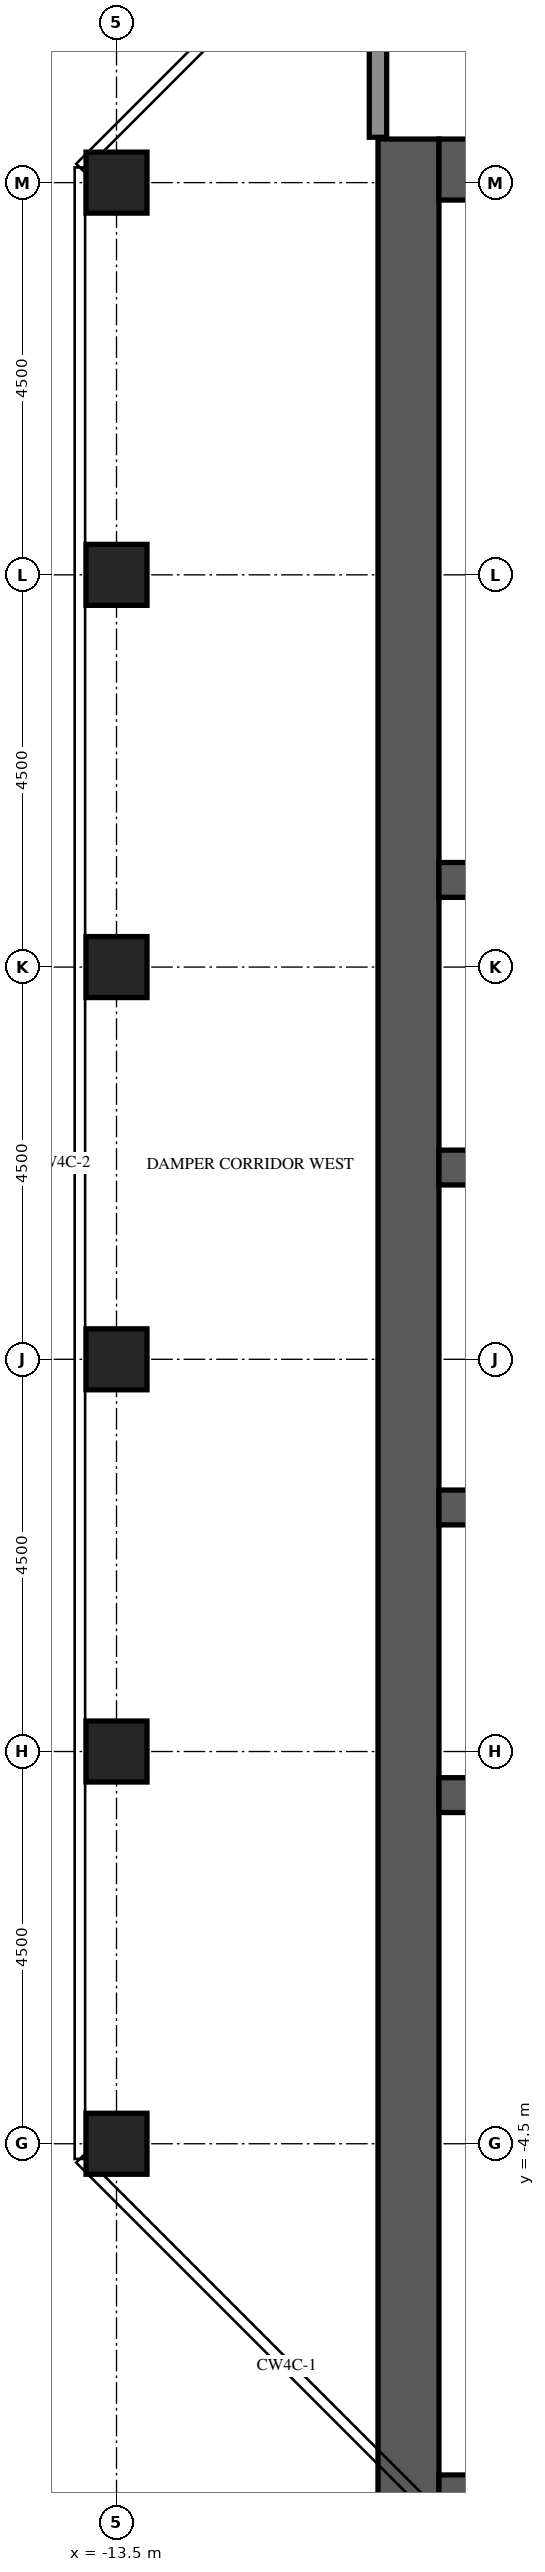
"""IFC4 building model, lengths in metres.
Left out: names, types, materials, properties, quantities, classifications, styles, units other than length and angle.
Written with IfcOpenShell. Run it as: python <this file> out.ifc"""

import sys

from ifc_helpers import new_model, si_unit, direction, frame, frame_2d, origin, origin_2d, place, context, subcontext, project, spatial, rectangle, extrude, element, fill, save


model = new_model("IFC4")
c1 = context("Model", 3, precision=1e-05, world=origin(), true_north=direction((0.0, 1.0)))
c2 = subcontext(c1, "Body", "Model", "MODEL_VIEW")
j1 = project(units=[si_unit("LENGTHUNIT", "METRE"), si_unit("PLANEANGLEUNIT", "RADIAN")], contexts=[c1])
p1 = place(None, origin())
s1 = spatial("IfcSite", under=j1, at=p1, CompositionType="ELEMENT")
p2 = place(p1, origin())
s2 = spatial("IfcBuilding", under=s1, at=p2, CompositionType="ELEMENT")
p3 = place(p2, frame((0.0, 0.0, 311.8)))
s3 = spatial("IfcBuildingStorey", under=s2, at=p3, CompositionType="ELEMENT", Elevation=311.8)
for number, where, z_axis, x_axis in (
    (1, (-13.5, -4.5, -0.6), (0.0, 0.0, 1.0), (1.0, 0.0, 0.0)),
    (2, (-13.5, 0.0, -0.6), (0.0, 0.0, 1.0), (1.0, 0.0, 0.0)),
    (3, (-13.5, 4.5, -0.6), (0.0, 0.0, 1.0), (1.0, 0.0, 0.0)),
    (4, (-13.5, 9.0, -0.6), (0.0, 0.0, 1.0), (1.0, 0.0, 0.0)),
    (5, (-13.5, 13.5, -0.6), (0.0, 0.0, 1.0), (1.0, 0.0, 0.0)),
    (6, (-13.5, 18.0, -0.6), (0.0, 0.0, 1.0), (1.0, 0.0, 0.0)),
):
    element("IfcColumn", number, at=place(p3, frame(where, z_axis=z_axis, x_axis=x_axis)), inside=s3, PredefinedType="COLUMN", context=c2, shape_type="SweptSolid", body=[
        extrude(rectangle(XDim=0.7, YDim=0.7, at=origin_2d()), origin(), (0.0, 0.0, 1.0), 5.4),
    ])
p4 = place(p3, frame((-10.15, -9.0, 0.0), z_axis=(0.0, 0.0, 1.0), x_axis=(0.0, 1.0, 0.0)))
e7 = element("IfcWall", 7, at=p4, inside=s3, PredefinedType="SHEAR", context=c2, shape_type="SweptSolid", body=[
    extrude(rectangle(XDim=27.5, YDim=0.7, at=frame_2d((13.75, 0.0))), origin(), (0.0, 0.0, 1.0), 4.8),
])
p5 = place(p4, frame((12.55, 0.0, 0.0)))
e8 = element("IfcOpeningElement", 8, at=p5, cuts=e7, PredefinedType="OPENING", context=c2, shape_type="SweptSolid", body=[
    extrude(rectangle(XDim=2.4, YDim=2.4, at=frame_2d((1.2, 1.2))), frame((0.0, 0.36, 0.0), z_axis=(0.0, -1.0, 0.0), x_axis=(1.0, 0.0, 0.0)), (0.0, 0.0, 1.0), 0.72),
])
p6 = place(p4, frame((6.825, 0.0, 0.0)))
e9 = element("IfcOpeningElement", 9, at=p6, cuts=e7, PredefinedType="OPENING", context=c2, shape_type="SweptSolid", body=[
    extrude(rectangle(XDim=1.2, YDim=2.1, at=frame_2d((0.6, 1.05))), frame((0.0, 0.36, 0.0), z_axis=(0.0, -1.0, 0.0), x_axis=(1.0, 0.0, 0.0)), (0.0, 0.0, 1.0), 0.72),
])
p7 = place(p4, frame((19.475, 0.0, 0.0)))
e10 = element("IfcOpeningElement", 10, at=p7, cuts=e7, PredefinedType="OPENING", context=c2, shape_type="SweptSolid", body=[
    extrude(rectangle(XDim=1.2, YDim=2.1, at=frame_2d((0.6, 1.05))), frame((0.0, 0.36, 0.0), z_axis=(0.0, -1.0, 0.0), x_axis=(1.0, 0.0, 0.0)), (0.0, 0.0, 1.0), 0.72),
])
for number, where, z_axis, x_axis in (
    (11, (-9.8, -8.65, 0.0), (0.0, 0.0, 1.0), (1.0, 0.0, 0.0)),
    (12, (-9.8, 18.15, 0.0), (0.0, 0.0, 1.0), (1.0, 0.0, 0.0)),
):
    element("IfcWall", number, at=place(p3, frame(where, z_axis=z_axis, x_axis=x_axis)), inside=s3, PredefinedType="SHEAR", context=c2, shape_type="SweptSolid", body=[
        extrude(rectangle(XDim=10.6, YDim=0.7, at=frame_2d((5.3, 0.0))), origin(), (0.0, 0.0, 1.0), 4.8),
    ])
p8 = place(p3, frame((-9.8, -0.5, 0.0), z_axis=(0.0, 0.0, 1.0), x_axis=(1.0, 0.0, 0.0)))
e13 = element("IfcWall", 13, at=p8, inside=s3, PredefinedType="SHEAR", context=c2, shape_type="SweptSolid", body=[
    extrude(rectangle(XDim=10.6, YDim=0.4, at=frame_2d((5.3, 0.0))), origin(), (0.0, 0.0, 1.0), 4.8),
])
p9 = place(p3, frame((-9.8, 2.8, 0.0), z_axis=(0.0, 0.0, 1.0), x_axis=(1.0, 0.0, 0.0)))
e14 = element("IfcWall", 14, at=p9, inside=s3, PredefinedType="SHEAR", context=c2, shape_type="SweptSolid", body=[
    extrude(rectangle(XDim=10.6, YDim=0.4, at=frame_2d((5.3, 0.0))), origin(), (0.0, 0.0, 1.0), 4.8),
])
p10 = place(p9, frame((0.688, 0.0, 0.0)))
e15 = element("IfcOpeningElement", 15, at=p10, cuts=e14, PredefinedType="OPENING", context=c2, shape_type="SweptSolid", body=[
    extrude(rectangle(XDim=1.1, YDim=2.1, at=frame_2d((0.55, 1.05))), frame((0.0, 0.21, 0.0), z_axis=(0.0, -1.0, 0.0), x_axis=(1.0, 0.0, 0.0)), (0.0, 0.0, 1.0), 0.42),
])
p11 = place(p9, frame((3.438, 0.0, 0.0)))
e16 = element("IfcOpeningElement", 16, at=p11, cuts=e14, PredefinedType="OPENING", context=c2, shape_type="SweptSolid", body=[
    extrude(rectangle(XDim=1.1, YDim=2.1, at=frame_2d((0.55, 1.05))), frame((0.0, 0.21, 0.0), z_axis=(0.0, -1.0, 0.0), x_axis=(1.0, 0.0, 0.0)), (0.0, 0.0, 1.0), 0.42),
])
p12 = place(p9, frame((6.113, 0.0, 0.0)))
e17 = element("IfcOpeningElement", 17, at=p12, cuts=e14, PredefinedType="OPENING", context=c2, shape_type="SweptSolid", body=[
    extrude(rectangle(XDim=1.0, YDim=2.1, at=frame_2d((0.5, 1.05))), frame((0.0, 0.21, 0.0), z_axis=(0.0, -1.0, 0.0), x_axis=(1.0, 0.0, 0.0)), (0.0, 0.0, 1.0), 0.42),
])
p13 = place(p9, frame((8.863, 0.0, 0.0)))
e18 = element("IfcOpeningElement", 18, at=p13, cuts=e14, PredefinedType="OPENING", context=c2, shape_type="SweptSolid", body=[
    extrude(rectangle(XDim=1.0, YDim=2.1, at=frame_2d((0.5, 1.05))), frame((0.0, 0.21, 0.0), z_axis=(0.0, -1.0, 0.0), x_axis=(1.0, 0.0, 0.0)), (0.0, 0.0, 1.0), 0.42),
])
p14 = place(p3, frame((-9.8, 6.7, 0.0), z_axis=(0.0, 0.0, 1.0), x_axis=(1.0, 0.0, 0.0)))
e19 = element("IfcWall", 19, at=p14, inside=s3, PredefinedType="SHEAR", context=c2, shape_type="SweptSolid", body=[
    extrude(rectangle(XDim=10.6, YDim=0.4, at=frame_2d((5.3, 0.0))), origin(), (0.0, 0.0, 1.0), 4.8),
])
p15 = place(p14, frame((0.738, 0.0, 0.0)))
e20 = element("IfcOpeningElement", 20, at=p15, cuts=e19, PredefinedType="OPENING", context=c2, shape_type="SweptSolid", body=[
    extrude(rectangle(XDim=1.0, YDim=2.1, at=frame_2d((0.5, 1.05))), frame((0.0, 0.21, 0.0), z_axis=(0.0, -1.0, 0.0), x_axis=(1.0, 0.0, 0.0)), (0.0, 0.0, 1.0), 0.42),
])
p16 = place(p14, frame((3.488, 0.0, 0.0)))
e21 = element("IfcOpeningElement", 21, at=p16, cuts=e19, PredefinedType="OPENING", context=c2, shape_type="SweptSolid", body=[
    extrude(rectangle(XDim=1.0, YDim=2.1, at=frame_2d((0.5, 1.05))), frame((0.0, 0.21, 0.0), z_axis=(0.0, -1.0, 0.0), x_axis=(1.0, 0.0, 0.0)), (0.0, 0.0, 1.0), 0.42),
])
p17 = place(p14, frame((6.113, 0.0, 0.0)))
e22 = element("IfcOpeningElement", 22, at=p17, cuts=e19, PredefinedType="OPENING", context=c2, shape_type="SweptSolid", body=[
    extrude(rectangle(XDim=1.0, YDim=2.1, at=frame_2d((0.5, 1.05))), frame((0.0, 0.21, 0.0), z_axis=(0.0, -1.0, 0.0), x_axis=(1.0, 0.0, 0.0)), (0.0, 0.0, 1.0), 0.42),
])
p18 = place(p14, frame((8.863, 0.0, 0.0)))
e23 = element("IfcOpeningElement", 23, at=p18, cuts=e19, PredefinedType="OPENING", context=c2, shape_type="SweptSolid", body=[
    extrude(rectangle(XDim=1.0, YDim=2.1, at=frame_2d((0.5, 1.05))), frame((0.0, 0.21, 0.0), z_axis=(0.0, -1.0, 0.0), x_axis=(1.0, 0.0, 0.0)), (0.0, 0.0, 1.0), 0.42),
])
p19 = place(p3, frame((-9.8, 10.0, 0.0), z_axis=(0.0, 0.0, 1.0), x_axis=(1.0, 0.0, 0.0)))
e24 = element("IfcWall", 24, at=p19, inside=s3, PredefinedType="SHEAR", context=c2, shape_type="SweptSolid", body=[
    extrude(rectangle(XDim=10.6, YDim=0.4, at=frame_2d((5.3, 0.0))), origin(), (0.0, 0.0, 1.0), 4.8),
])
p20 = place(p3, frame((-10.5, 18.52, 0.0), z_axis=(0.0, 0.0, 1.0), x_axis=(0.0, 1.0, 0.0)))
e25 = element("IfcWall", 25, at=p20, inside=s3, PredefinedType="PARTITIONING", context=c2, shape_type="SweptSolid", body=[
    extrude(rectangle(XDim=2.275, YDim=0.2, at=frame_2d((1.137, 0.0))), origin(), (0.0, 0.0, 1.0), 4.2),
])
p21 = place(p5, origin())
e26 = element("IfcDoor", 26, at=p21, inside=s3, OperationType="DOUBLE_DOOR_DOUBLE_SWING", PredefinedType="DOOR", context=c2, shape_type="SweptSolid", body=[
    extrude(rectangle(XDim=2.4, YDim=2.4, at=frame_2d((1.2, 1.2))), frame((0.0, 0.025, 0.0), z_axis=(0.0, -1.0, 0.0), x_axis=(1.0, 0.0, 0.0)), (0.0, 0.0, 1.0), 0.05),
])
fill(e8, e26)
p22 = place(p6, origin())
e27 = element("IfcDoor", 27, at=p22, inside=s3, OperationType="SINGLE_SWING_LEFT", PredefinedType="DOOR", context=c2, shape_type="SweptSolid", body=[
    extrude(rectangle(XDim=1.2, YDim=2.1, at=frame_2d((0.6, 1.05))), frame((0.0, 0.025, 0.0), z_axis=(0.0, -1.0, 0.0), x_axis=(1.0, 0.0, 0.0)), (0.0, 0.0, 1.0), 0.05),
])
fill(e9, e27)
p23 = place(p7, origin())
e28 = element("IfcDoor", 28, at=p23, inside=s3, OperationType="SINGLE_SWING_LEFT", PredefinedType="DOOR", context=c2, shape_type="SweptSolid", body=[
    extrude(rectangle(XDim=1.2, YDim=2.1, at=frame_2d((0.6, 1.05))), frame((0.0, 0.025, 0.0), z_axis=(0.0, -1.0, 0.0), x_axis=(1.0, 0.0, 0.0)), (0.0, 0.0, 1.0), 0.05),
])
fill(e10, e28)
save(model, sys.argv[1])
